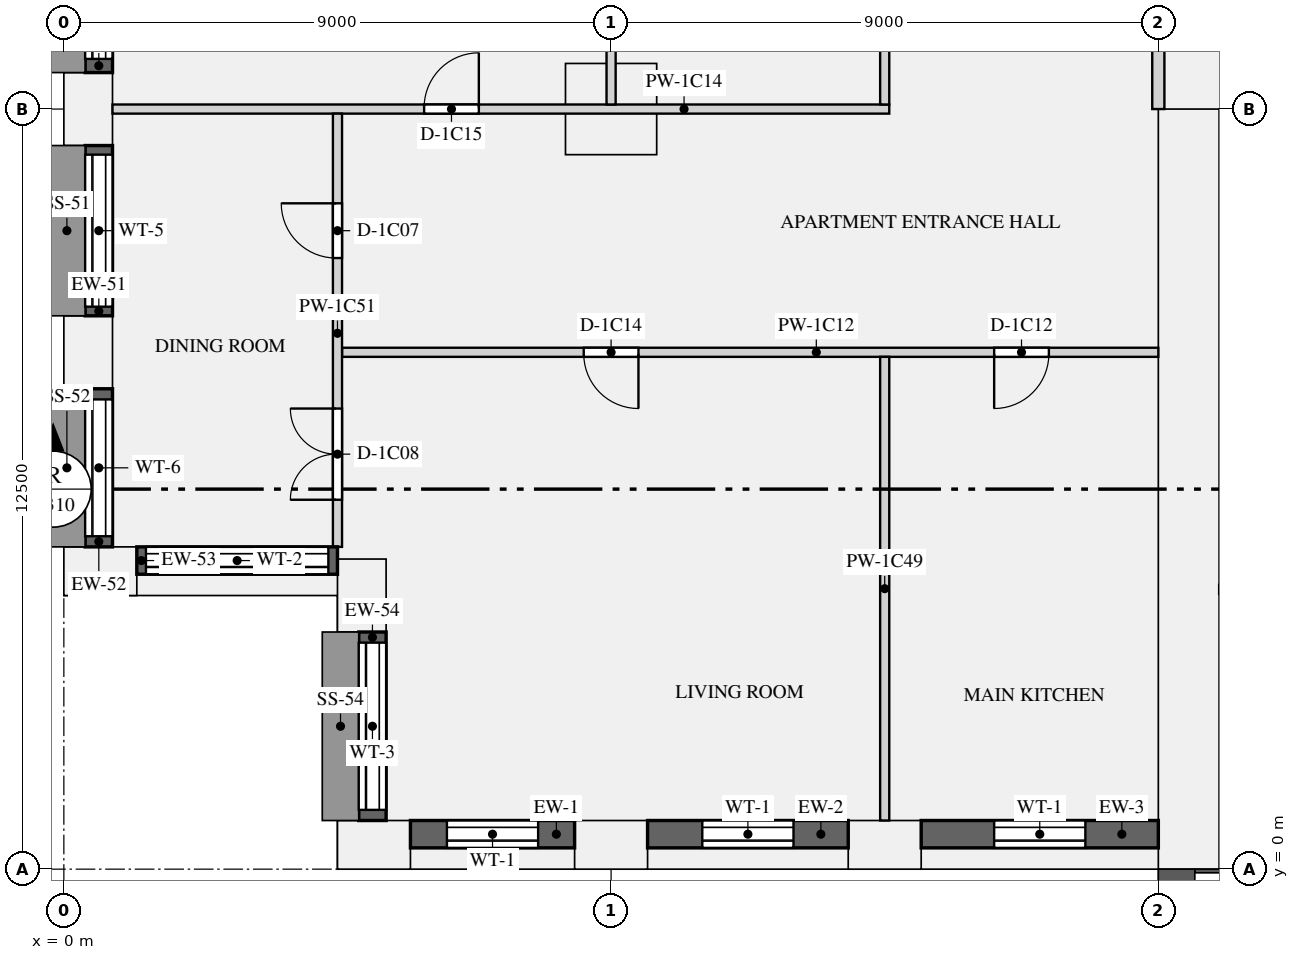
"""IFC4 building model, lengths in metres.
Left out: names, types, materials, properties, quantities, classifications, styles, units other than length and angle.
Written with IfcOpenShell. Run it as: python <this file> out.ifc"""

import sys

from ifc_helpers import new_model, si_unit, direction, frame, frame_2d, origin, origin_2d, place, context, subcontext, project, spatial, rectangle, extrude, element, fill, save


model = new_model("IFC4")
c1 = context("Model", 3, precision=1e-05, world=origin(), true_north=direction((0.0, 1.0)))
c2 = subcontext(c1, "Body", "Model", "MODEL_VIEW")
j1 = project(units=[si_unit("LENGTHUNIT", "METRE"), si_unit("PLANEANGLEUNIT", "RADIAN")], contexts=[c1])
p1 = place(None, origin())
s1 = spatial("IfcSite", under=j1, at=p1, CompositionType="ELEMENT")
p2 = place(p1, origin())
s2 = spatial("IfcBuilding", under=s1, at=p2, CompositionType="ELEMENT")
p3 = place(p2, frame((0.0, 0.0, 38.4)))
s3 = spatial("IfcBuildingStorey", under=s2, at=p3, CompositionType="ELEMENT", Elevation=38.4)
for number, where, z_axis, x_axis in (
    (1, (5.1, 0.4, 0.0), (0.0, 0.0, 1.0), (1.0, 0.0, 0.0)),
    (2, (9.0, 0.4, 0.0), (0.0, 0.0, 1.0), (1.0, 0.0, 0.0)),
    (3, (13.5, 0.4, 0.0), (0.0, 0.0, 1.0), (1.0, 0.0, 0.0)),
    (4, (0.4, 12.5, 0.0), (0.0, 0.0, 1.0), (0.0, -1.0, 0.0)),
    (5, (0.4, 8.5, 0.0), (0.0, 0.0, 1.0), (0.0, -1.0, 0.0)),
    (6, (0.6, 4.9, 0.0), (0.0, 0.0, 1.0), (1.0, 0.0, 0.0)),
    (7, (4.9, 4.5, 0.0), (0.0, 0.0, 1.0), (0.0, -1.0, 0.0)),
):
    element("IfcColumn", number, at=place(p3, frame(where, z_axis=z_axis, x_axis=x_axis)), inside=s3, PredefinedType="USERDEFINED", context=c2, shape_type="SweptSolid", body=[
        extrude(rectangle(XDim=1.2, YDim=0.8, at=origin_2d()), origin(), (0.0, 0.0, 1.0), 3.15),
    ])
p4 = place(p3, frame((9.0, 12.5, 0.0), z_axis=(0.0, 0.0, 1.0), x_axis=(1.0, 0.0, 0.0)))
e8 = element("IfcColumn", 8, at=p4, inside=s3, PredefinedType="COLUMN", context=c2, shape_type="SweptSolid", body=[
    extrude(rectangle(XDim=1.5, YDim=1.5, at=origin_2d()), origin(), (0.0, 0.0, 1.0), 3.15),
])
p5 = place(p3, frame((18.5, 0.0, 0.0), z_axis=(0.0, 0.0, 1.0), x_axis=(0.0, 1.0, 0.0)))
e9 = element("IfcWall", 9, at=p5, inside=s3, PredefinedType="SHEAR", context=c2, shape_type="SweptSolid", body=[
    extrude(rectangle(XDim=12.5, YDim=1.0, at=frame_2d((6.25, 0.0))), origin(), (0.0, 0.0, 1.0), 3.15),
])
p6 = place(p3, frame((5.7, 0.575, 0.9), z_axis=(0.0, 0.0, 1.0), x_axis=(1.0, 0.0, 0.0)))
e10 = element("IfcWall", 10, at=p6, inside=s3, PredefinedType="SOLIDWALL", context=c2, shape_type="SweptSolid", body=[
    extrude(rectangle(XDim=2.7, YDim=0.45, at=frame_2d((1.35, 0.0))), origin(), (0.0, 0.0, 1.0), 1.93),
])
p7 = place(p6, frame((0.6, 0.0, 0.15)))
e11 = element("IfcOpeningElement", 11, at=p7, cuts=e10, PredefinedType="OPENING", context=c2, shape_type="SweptSolid", body=[
    extrude(rectangle(XDim=1.5, YDim=1.5, at=frame_2d((0.75, 0.75))), frame((0.0, 0.235, 0.0), z_axis=(0.0, -1.0, 0.0), x_axis=(1.0, 0.0, 0.0)), (0.0, 0.0, 1.0), 0.47),
])
p8 = place(p3, frame((9.6, 0.575, 0.9), z_axis=(0.0, 0.0, 1.0), x_axis=(1.0, 0.0, 0.0)))
e12 = element("IfcWall", 12, at=p8, inside=s3, PredefinedType="SOLIDWALL", context=c2, shape_type="SweptSolid", body=[
    extrude(rectangle(XDim=3.3, YDim=0.45, at=frame_2d((1.65, 0.0))), origin(), (0.0, 0.0, 1.0), 1.93),
])
p9 = place(p8, frame((0.9, 0.0, 0.15)))
e13 = element("IfcOpeningElement", 13, at=p9, cuts=e12, PredefinedType="OPENING", context=c2, shape_type="SweptSolid", body=[
    extrude(rectangle(XDim=1.5, YDim=1.5, at=frame_2d((0.75, 0.75))), frame((0.0, 0.235, 0.0), z_axis=(0.0, -1.0, 0.0), x_axis=(1.0, 0.0, 0.0)), (0.0, 0.0, 1.0), 0.47),
])
p10 = place(p3, frame((14.1, 0.575, 0.9), z_axis=(0.0, 0.0, 1.0), x_axis=(1.0, 0.0, 0.0)))
e14 = element("IfcWall", 14, at=p10, inside=s3, PredefinedType="SOLIDWALL", context=c2, shape_type="SweptSolid", body=[
    extrude(rectangle(XDim=3.9, YDim=0.45, at=frame_2d((1.95, 0.0))), origin(), (0.0, 0.0, 1.0), 1.93),
])
p11 = place(p10, frame((1.2, 0.0, 0.15)))
e15 = element("IfcOpeningElement", 15, at=p11, cuts=e14, PredefinedType="OPENING", context=c2, shape_type="SweptSolid", body=[
    extrude(rectangle(XDim=1.5, YDim=1.5, at=frame_2d((0.75, 0.75))), frame((0.0, 0.235, 0.0), z_axis=(0.0, -1.0, 0.0), x_axis=(1.0, 0.0, 0.0)), (0.0, 0.0, 1.0), 0.47),
])
p12 = place(p3, frame((0.575, 15.3, 0.9), z_axis=(0.0, 0.0, 1.0), x_axis=(0.0, -1.0, 0.0)))
e16 = element("IfcWall", 16, at=p12, inside=s3, PredefinedType="SOLIDWALL", context=c2, shape_type="SweptSolid", body=[
    extrude(rectangle(XDim=2.2, YDim=0.45, at=frame_2d((1.1, 0.0))), origin(), (0.0, 0.0, 1.0), 1.93),
])
p13 = place(p12, frame((0.225, 0.0, 0.15)))
e17 = element("IfcOpeningElement", 17, at=p13, cuts=e16, PredefinedType="OPENING", context=c2, shape_type="SweptSolid", body=[
    extrude(rectangle(XDim=1.75, YDim=1.5, at=frame_2d((0.875, 0.75))), frame((0.0, 0.235, 0.0), z_axis=(0.0, -1.0, 0.0), x_axis=(1.0, 0.0, 0.0)), (0.0, 0.0, 1.0), 0.47),
])
p14 = place(p3, frame((0.575, 11.9, 0.9), z_axis=(0.0, 0.0, 1.0), x_axis=(0.0, -1.0, 0.0)))
e18 = element("IfcWall", 18, at=p14, inside=s3, PredefinedType="SOLIDWALL", context=c2, shape_type="SweptSolid", body=[
    extrude(rectangle(XDim=2.8, YDim=0.45, at=frame_2d((1.4, 0.0))), origin(), (0.0, 0.0, 1.0), 1.93),
])
p15 = place(p14, frame((0.15, 0.0, 0.15)))
e19 = element("IfcOpeningElement", 19, at=p15, cuts=e18, PredefinedType="OPENING", context=c2, shape_type="SweptSolid", body=[
    extrude(rectangle(XDim=2.5, YDim=1.5, at=frame_2d((1.25, 0.75))), frame((0.0, 0.235, 0.0), z_axis=(0.0, -1.0, 0.0), x_axis=(1.0, 0.0, 0.0)), (0.0, 0.0, 1.0), 0.47),
])
p16 = place(p3, frame((0.575, 7.9, 0.9), z_axis=(0.0, 0.0, 1.0), x_axis=(0.0, -1.0, 0.0)))
e20 = element("IfcWall", 20, at=p16, inside=s3, PredefinedType="SOLIDWALL", context=c2, shape_type="SweptSolid", body=[
    extrude(rectangle(XDim=2.6, YDim=0.45, at=frame_2d((1.3, 0.0))), origin(), (0.0, 0.0, 1.0), 1.93),
])
p17 = place(p16, frame((0.175, 0.0, 0.15)))
e21 = element("IfcOpeningElement", 21, at=p17, cuts=e20, PredefinedType="OPENING", context=c2, shape_type="SweptSolid", body=[
    extrude(rectangle(XDim=2.25, YDim=1.5, at=frame_2d((1.125, 0.75))), frame((0.0, 0.235, 0.0), z_axis=(0.0, -1.0, 0.0), x_axis=(1.0, 0.0, 0.0)), (0.0, 0.0, 1.0), 0.47),
])
p18 = place(p3, frame((1.2, 5.075, 0.9), z_axis=(0.0, 0.0, 1.0), x_axis=(1.0, 0.0, 0.0)))
e22 = element("IfcWall", 22, at=p18, inside=s3, PredefinedType="SOLIDWALL", context=c2, shape_type="SweptSolid", body=[
    extrude(rectangle(XDim=3.3, YDim=0.45, at=frame_2d((1.65, 0.0))), origin(), (0.0, 0.0, 1.0), 1.93),
])
p19 = place(p18, frame((0.15, 0.0, 0.15)))
e23 = element("IfcOpeningElement", 23, at=p19, cuts=e22, PredefinedType="OPENING", context=c2, shape_type="SweptSolid", body=[
    extrude(rectangle(XDim=3.0, YDim=1.5, at=frame_2d((1.5, 0.75))), frame((0.0, 0.235, 0.0), z_axis=(0.0, -1.0, 0.0), x_axis=(1.0, 0.0, 0.0)), (0.0, 0.0, 1.0), 0.47),
])
p20 = place(p3, frame((5.075, 3.9, 0.9), z_axis=(0.0, 0.0, 1.0), x_axis=(0.0, -1.0, 0.0)))
e24 = element("IfcWall", 24, at=p20, inside=s3, PredefinedType="SOLIDWALL", context=c2, shape_type="SweptSolid", body=[
    extrude(rectangle(XDim=3.1, YDim=0.45, at=frame_2d((1.55, 0.0))), origin(), (0.0, 0.0, 1.0), 1.93),
])
p21 = place(p20, frame((0.175, 0.0, 0.15)))
e25 = element("IfcOpeningElement", 25, at=p21, cuts=e24, PredefinedType="OPENING", context=c2, shape_type="SweptSolid", body=[
    extrude(rectangle(XDim=2.75, YDim=1.5, at=frame_2d((1.375, 0.75))), frame((0.0, 0.235, 0.0), z_axis=(0.0, -1.0, 0.0), x_axis=(1.0, 0.0, 0.0)), (0.0, 0.0, 1.0), 0.47),
])
p22 = place(p3, frame((19.0, 4.6, 0.0), z_axis=(0.0, 0.0, 1.0), x_axis=(1.0, 0.0, 0.0)))
e26 = element("IfcWall", 26, at=p22, inside=s3, PredefinedType="PARTITIONING", context=c2, shape_type="SweptSolid", body=[
    extrude(rectangle(XDim=8.3, YDim=0.15, at=frame_2d((4.15, 0.0))), origin(), (0.0, 0.0, 1.0), 2.83),
])
p23 = place(p22, frame((0.45, 0.0, 0.0)))
e27 = element("IfcOpeningElement", 27, at=p23, cuts=e26, PredefinedType="OPENING", context=c2, shape_type="SweptSolid", body=[
    extrude(rectangle(XDim=0.9, YDim=2.1, at=frame_2d((0.45, 1.05))), frame((0.0, 0.085, 0.0), z_axis=(0.0, -1.0, 0.0), x_axis=(1.0, 0.0, 0.0)), (0.0, 0.0, 1.0), 0.17),
])
p24 = place(p22, frame((4.65, 0.0, 0.0)))
e28 = element("IfcOpeningElement", 28, at=p24, cuts=e26, PredefinedType="OPENING", context=c2, shape_type="SweptSolid", body=[
    extrude(rectangle(XDim=0.9, YDim=2.1, at=frame_2d((0.45, 1.05))), frame((0.0, 0.085, 0.0), z_axis=(0.0, -1.0, 0.0), x_axis=(1.0, 0.0, 0.0)), (0.0, 0.0, 1.0), 0.17),
])
p25 = place(p3, frame((18.0, 12.5, 0.0), z_axis=(0.0, 0.0, 1.0), x_axis=(0.0, 1.0, 0.0)))
e29 = element("IfcWall", 29, at=p25, inside=s3, PredefinedType="PARTITIONING", context=c2, shape_type="SweptSolid", body=[
    extrude(rectangle(XDim=3.4, YDim=0.2, at=frame_2d((1.7, 0.0))), origin(), (0.0, 0.0, 1.0), 2.83),
])
p26 = place(p3, frame((4.575, 8.5, 0.0), z_axis=(0.0, 0.0, 1.0), x_axis=(1.0, 0.0, 0.0)))
e30 = element("IfcWall", 30, at=p26, inside=s3, PredefinedType="PARTITIONING", context=c2, shape_type="SweptSolid", body=[
    extrude(rectangle(XDim=13.425, YDim=0.15, at=frame_2d((6.712, 0.0))), origin(), (0.0, 0.0, 1.0), 2.83),
])
p27 = place(p26, frame((10.725, 0.0, 0.0)))
e31 = element("IfcOpeningElement", 31, at=p27, cuts=e30, PredefinedType="OPENING", context=c2, shape_type="SweptSolid", body=[
    extrude(rectangle(XDim=0.9, YDim=2.1, at=frame_2d((0.45, 1.05))), frame((0.0, 0.085, 0.0), z_axis=(0.0, -1.0, 0.0), x_axis=(1.0, 0.0, 0.0)), (0.0, 0.0, 1.0), 0.17),
])
p28 = place(p26, frame((3.975, 0.0, 0.0)))
e32 = element("IfcOpeningElement", 32, at=p28, cuts=e30, PredefinedType="OPENING", context=c2, shape_type="SweptSolid", body=[
    extrude(rectangle(XDim=0.9, YDim=2.1, at=frame_2d((0.45, 1.05))), frame((0.0, 0.085, 0.0), z_axis=(0.0, -1.0, 0.0), x_axis=(1.0, 0.0, 0.0)), (0.0, 0.0, 1.0), 0.17),
])
p29 = place(p3, frame((0.8, 12.5, 0.0), z_axis=(0.0, 0.0, 1.0), x_axis=(1.0, 0.0, 0.0)))
e33 = element("IfcWall", 33, at=p29, inside=s3, PredefinedType="PARTITIONING", context=c2, shape_type="SweptSolid", body=[
    extrude(rectangle(XDim=12.775, YDim=0.15, at=frame_2d((6.387, 0.0))), origin(), (0.0, 0.0, 1.0), 2.83),
])
p30 = place(p29, frame((5.125, 0.0, 0.0)))
e34 = element("IfcOpeningElement", 34, at=p30, cuts=e33, PredefinedType="OPENING", context=c2, shape_type="SweptSolid", body=[
    extrude(rectangle(XDim=0.9, YDim=2.1, at=frame_2d((0.45, 1.05))), frame((0.0, 0.085, 0.0), z_axis=(0.0, -1.0, 0.0), x_axis=(1.0, 0.0, 0.0)), (0.0, 0.0, 1.0), 0.17),
])
p31 = place(p3, frame((13.5, 0.8, 0.0), z_axis=(0.0, 0.0, 1.0), x_axis=(0.0, 1.0, 0.0)))
e35 = element("IfcWall", 35, at=p31, inside=s3, PredefinedType="PARTITIONING", context=c2, shape_type="SweptSolid", body=[
    extrude(rectangle(XDim=7.625, YDim=0.15, at=frame_2d((3.812, 0.0))), origin(), (0.0, 0.0, 1.0), 2.83),
])
p32 = place(p3, frame((13.5, 12.575, 0.0), z_axis=(0.0, 0.0, 1.0), x_axis=(0.0, 1.0, 0.0)))
e36 = element("IfcWall", 36, at=p32, inside=s3, PredefinedType="PARTITIONING", context=c2, shape_type="SweptSolid", body=[
    extrude(rectangle(XDim=7.85, YDim=0.15, at=frame_2d((3.925, 0.0))), origin(), (0.0, 0.0, 1.0), 2.83),
])
p33 = place(p3, frame((4.5, 5.3, 0.0), z_axis=(0.0, 0.0, 1.0), x_axis=(0.0, 1.0, 0.0)))
e37 = element("IfcWall", 37, at=p33, inside=s3, PredefinedType="PARTITIONING", context=c2, shape_type="SweptSolid", body=[
    extrude(rectangle(XDim=7.125, YDim=0.15, at=frame_2d((3.562, 0.0))), origin(), (0.0, 0.0, 1.0), 2.83),
])
p34 = place(p33, frame((4.75, 0.0, 0.0)))
e38 = element("IfcOpeningElement", 38, at=p34, cuts=e37, PredefinedType="OPENING", context=c2, shape_type="SweptSolid", body=[
    extrude(rectangle(XDim=0.9, YDim=2.1, at=frame_2d((0.45, 1.05))), frame((0.0, 0.085, 0.0), z_axis=(0.0, -1.0, 0.0), x_axis=(1.0, 0.0, 0.0)), (0.0, 0.0, 1.0), 0.17),
])
p35 = place(p33, frame((0.775, 0.0, 0.0)))
e39 = element("IfcOpeningElement", 39, at=p35, cuts=e37, PredefinedType="OPENING", context=c2, shape_type="SweptSolid", body=[
    extrude(rectangle(XDim=1.5, YDim=2.1, at=frame_2d((0.75, 1.05))), frame((0.0, 0.085, 0.0), z_axis=(0.0, -1.0, 0.0), x_axis=(1.0, 0.0, 0.0)), (0.0, 0.0, 1.0), 0.17),
])
p36 = place(p3, frame((9.0, 12.575, 0.0), z_axis=(0.0, 0.0, 1.0), x_axis=(0.0, 1.0, 0.0)))
e40 = element("IfcWall", 40, at=p36, inside=s3, PredefinedType="PARTITIONING", context=c2, shape_type="SweptSolid", body=[
    extrude(rectangle(XDim=7.85, YDim=0.15, at=frame_2d((3.925, 0.0))), origin(), (0.0, 0.0, 1.0), 2.83),
])
p37 = place(p36, frame((1.9, 0.0, 0.0)))
e41 = element("IfcOpeningElement", 41, at=p37, cuts=e40, PredefinedType="OPENING", context=c2, shape_type="SweptSolid", body=[
    extrude(rectangle(XDim=0.8, YDim=2.1, at=frame_2d((0.4, 1.05))), frame((0.0, 0.085, 0.0), z_axis=(0.0, -1.0, 0.0), x_axis=(1.0, 0.0, 0.0)), (0.0, 0.0, 1.0), 0.17),
])
p38 = place(p7, origin())
e42 = element("IfcWindow", 42, at=p38, inside=s3, PartitioningType="SINGLE_PANEL", PredefinedType="WINDOW", context=c2, shape_type="SweptSolid", body=[
    extrude(rectangle(XDim=1.5, YDim=1.5, at=frame_2d((0.75, 0.75))), frame((0.0, -0.065, 0.0), z_axis=(0.0, -1.0, 0.0), x_axis=(1.0, 0.0, 0.0)), (0.0, 0.0, 1.0), 0.06),
])
fill(e11, e42)
p39 = place(p9, origin())
e43 = element("IfcWindow", 43, at=p39, inside=s3, PartitioningType="SINGLE_PANEL", PredefinedType="WINDOW", context=c2, shape_type="SweptSolid", body=[
    extrude(rectangle(XDim=1.5, YDim=1.5, at=frame_2d((0.75, 0.75))), frame((0.0, -0.065, 0.0), z_axis=(0.0, -1.0, 0.0), x_axis=(1.0, 0.0, 0.0)), (0.0, 0.0, 1.0), 0.06),
])
fill(e13, e43)
p40 = place(p11, origin())
e44 = element("IfcWindow", 44, at=p40, inside=s3, PartitioningType="SINGLE_PANEL", PredefinedType="WINDOW", context=c2, shape_type="SweptSolid", body=[
    extrude(rectangle(XDim=1.5, YDim=1.5, at=frame_2d((0.75, 0.75))), frame((0.0, -0.065, 0.0), z_axis=(0.0, -1.0, 0.0), x_axis=(1.0, 0.0, 0.0)), (0.0, 0.0, 1.0), 0.06),
])
fill(e15, e44)
p41 = place(p13, origin())
e45 = element("IfcWindow", 45, at=p41, inside=s3, PartitioningType="SINGLE_PANEL", PredefinedType="WINDOW", context=c2, shape_type="SweptSolid", body=[
    extrude(rectangle(XDim=1.75, YDim=1.5, at=frame_2d((0.875, 0.75))), frame((0.0, -0.065, 0.0), z_axis=(0.0, -1.0, 0.0), x_axis=(1.0, 0.0, 0.0)), (0.0, 0.0, 1.0), 0.06),
])
fill(e17, e45)
p42 = place(p15, origin())
e46 = element("IfcWindow", 46, at=p42, inside=s3, PartitioningType="SINGLE_PANEL", PredefinedType="WINDOW", context=c2, shape_type="SweptSolid", body=[
    extrude(rectangle(XDim=2.5, YDim=1.5, at=frame_2d((1.25, 0.75))), frame((0.0, -0.065, 0.0), z_axis=(0.0, -1.0, 0.0), x_axis=(1.0, 0.0, 0.0)), (0.0, 0.0, 1.0), 0.06),
])
fill(e19, e46)
p43 = place(p17, origin())
e47 = element("IfcWindow", 47, at=p43, inside=s3, PartitioningType="SINGLE_PANEL", PredefinedType="WINDOW", context=c2, shape_type="SweptSolid", body=[
    extrude(rectangle(XDim=2.25, YDim=1.5, at=frame_2d((1.125, 0.75))), frame((0.0, -0.065, 0.0), z_axis=(0.0, -1.0, 0.0), x_axis=(1.0, 0.0, 0.0)), (0.0, 0.0, 1.0), 0.06),
])
fill(e21, e47)
p44 = place(p19, origin())
e48 = element("IfcWindow", 48, at=p44, inside=s3, PartitioningType="SINGLE_PANEL", PredefinedType="WINDOW", context=c2, shape_type="SweptSolid", body=[
    extrude(rectangle(XDim=3.0, YDim=1.5, at=frame_2d((1.5, 0.75))), frame((0.0, -0.065, 0.0), z_axis=(0.0, -1.0, 0.0), x_axis=(1.0, 0.0, 0.0)), (0.0, 0.0, 1.0), 0.06),
])
fill(e23, e48)
p45 = place(p21, origin())
e49 = element("IfcWindow", 49, at=p45, inside=s3, PartitioningType="SINGLE_PANEL", PredefinedType="WINDOW", context=c2, shape_type="SweptSolid", body=[
    extrude(rectangle(XDim=2.75, YDim=1.5, at=frame_2d((1.375, 0.75))), frame((0.0, -0.065, 0.0), z_axis=(0.0, -1.0, 0.0), x_axis=(1.0, 0.0, 0.0)), (0.0, 0.0, 1.0), 0.06),
])
fill(e25, e49)
p46 = place(p34, origin())
e50 = element("IfcDoor", 50, at=p46, inside=s3, OperationType="SINGLE_SWING_RIGHT", PredefinedType="DOOR", context=c2, shape_type="SweptSolid", body=[
    extrude(rectangle(XDim=0.9, YDim=2.1, at=frame_2d((0.45, 1.05))), frame((0.0, 0.025, 0.0), z_axis=(0.0, -1.0, 0.0), x_axis=(1.0, 0.0, 0.0)), (0.0, 0.0, 1.0), 0.05),
])
fill(e38, e50)
p47 = place(p35, origin())
e51 = element("IfcDoor", 51, at=p47, inside=s3, OperationType="DOUBLE_DOOR_SINGLE_SWING", PredefinedType="DOOR", context=c2, shape_type="SweptSolid", body=[
    extrude(rectangle(XDim=1.5, YDim=2.1, at=frame_2d((0.75, 1.05))), frame((0.0, 0.025, 0.0), z_axis=(0.0, -1.0, 0.0), x_axis=(1.0, 0.0, 0.0)), (0.0, 0.0, 1.0), 0.05),
])
fill(e39, e51)
p48 = place(p27, frame((0.9, 0.0, 0.0), z_axis=(0.0, 0.0, 1.0), x_axis=(-1.0, 0.0, 0.0)))
e52 = element("IfcDoor", 52, at=p48, inside=s3, OperationType="SINGLE_SWING_RIGHT", PredefinedType="DOOR", context=c2, shape_type="SweptSolid", body=[
    extrude(rectangle(XDim=0.9, YDim=2.1, at=frame_2d((0.45, 1.05))), frame((0.0, 0.025, 0.0), z_axis=(0.0, -1.0, 0.0), x_axis=(1.0, 0.0, 0.0)), (0.0, 0.0, 1.0), 0.05),
])
fill(e31, e52)
p49 = place(p28, frame((0.9, 0.0, 0.0), z_axis=(0.0, 0.0, 1.0), x_axis=(-1.0, 0.0, 0.0)))
e53 = element("IfcDoor", 53, at=p49, inside=s3, OperationType="SINGLE_SWING_LEFT", PredefinedType="DOOR", context=c2, shape_type="SweptSolid", body=[
    extrude(rectangle(XDim=0.9, YDim=2.1, at=frame_2d((0.45, 1.05))), frame((0.0, 0.025, 0.0), z_axis=(0.0, -1.0, 0.0), x_axis=(1.0, 0.0, 0.0)), (0.0, 0.0, 1.0), 0.05),
])
fill(e32, e53)
p50 = place(p30, origin())
e54 = element("IfcDoor", 54, at=p50, inside=s3, OperationType="SINGLE_SWING_RIGHT", PredefinedType="DOOR", context=c2, shape_type="SweptSolid", body=[
    extrude(rectangle(XDim=0.9, YDim=2.1, at=frame_2d((0.45, 1.05))), frame((0.0, 0.025, 0.0), z_axis=(0.0, -1.0, 0.0), x_axis=(1.0, 0.0, 0.0)), (0.0, 0.0, 1.0), 0.05),
])
fill(e34, e54)
save(model, sys.argv[1])
